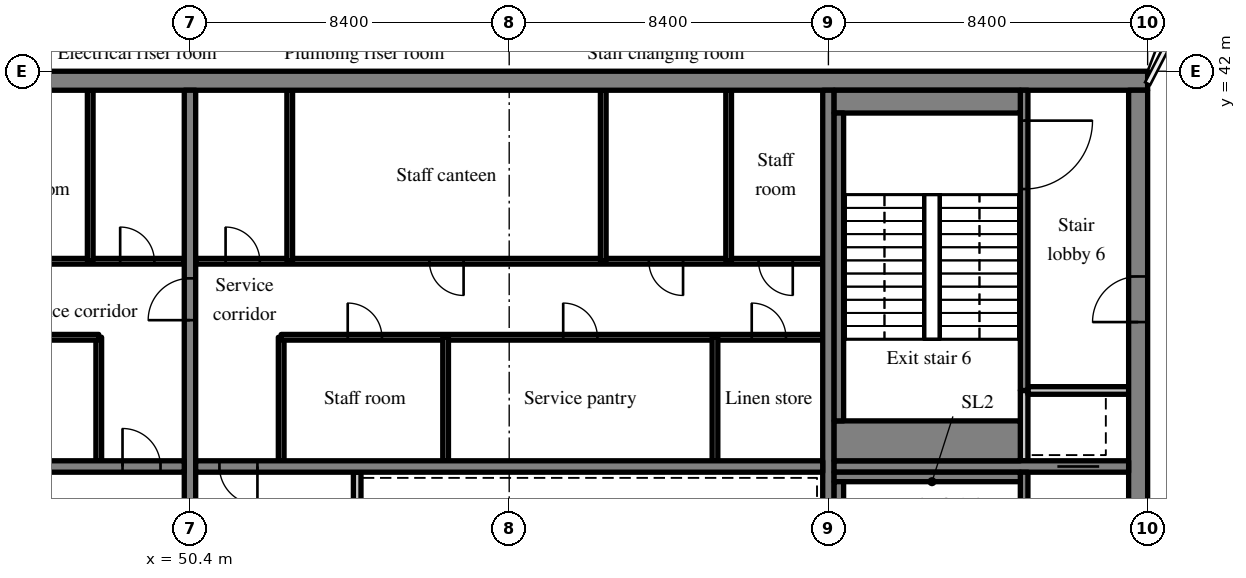
"""IFC4 building model, lengths in metres.
Left out: names, types, materials, properties, quantities, classifications, styles, units other than length and angle.
Written with IfcOpenShell. Run it as: python <this file> out.ifc"""

import sys

from ifc_helpers import new_model, si_unit, direction, frame, frame_2d, origin, place, context, subcontext, project, spatial, rectangle, extrude, source, transform, mapped, element, fill, save


model = new_model("IFC4")
c1 = context("Model", 3, precision=1e-05, world=origin(), true_north=direction((0.0, 1.0)))
c2 = subcontext(c1, "Body", "Model", "MODEL_VIEW")
j1 = project(units=[si_unit("LENGTHUNIT", "METRE"), si_unit("PLANEANGLEUNIT", "RADIAN")], contexts=[c1])
p1 = place(None, origin())
s1 = spatial("IfcSite", under=j1, at=p1, CompositionType="ELEMENT")
p2 = place(p1, origin())
s2 = spatial("IfcBuilding", under=s1, at=p2, CompositionType="ELEMENT")
p3 = place(p2, frame((0.0, 0.0, 323.7)))
s3 = spatial("IfcBuildingStorey", under=s2, at=p3, CompositionType="ELEMENT", Elevation=323.7)
m1 = source(origin(), c2, "Body", "SweptSolid", [
    extrude(rectangle(XDim=50.4, YDim=0.5, at=frame_2d((25.2, 0.0))), origin(), (0.0, 0.0, 1.0), 5.72),
])
p4 = place(p3, frame((25.2, 41.75, 0.0), z_axis=(0.0, 0.0, 1.0), x_axis=(1.0, 0.0, 0.0)))
e1 = element("IfcWall", 1, at=p4, inside=s3, PredefinedType="SHEAR", context=c2, shape_type="MappedRepresentation", body=[
    mapped(m1, transform((0.0, 0.0, 0.0), scale=1.0)),
])
m2 = source(origin(), c2, "Body", "SweptSolid", [
    extrude(rectangle(XDim=19.0, YDim=0.5, at=frame_2d((9.5, 0.0))), origin(), (0.0, 0.0, 1.0), 5.72),
])
p5 = place(p3, frame((75.35, 22.5, 0.0), z_axis=(0.0, 0.0, 1.0), x_axis=(0.0, 1.0, 0.0)))
e2 = element("IfcWall", 2, at=p5, inside=s3, PredefinedType="SHEAR", context=c2, shape_type="MappedRepresentation", body=[
    mapped(m2, transform((0.0, 0.0, 0.0), scale=1.0)),
])
m3 = source(origin(), c2, "Body", "SweptSolid", [
    extrude(rectangle(XDim=1.2, YDim=2.1, at=frame_2d((0.6, 1.05))), frame((0.0, 0.26, 0.0), z_axis=(0.0, -1.0, 0.0), x_axis=(1.0, 0.0, 0.0)), (0.0, 0.0, 1.0), 0.52),
])
p6 = place(p5, frame((12.9, 0.0, 0.0)))
e3 = element("IfcOpeningElement", 3, at=p6, cuts=e2, PredefinedType="OPENING", context=c2, shape_type="MappedRepresentation", body=[
    mapped(m3, transform((0.0, 0.0, 0.0), scale=1.0)),
])
m4 = source(origin(), c2, "Body", "SweptSolid", [
    extrude(rectangle(XDim=19.0, YDim=0.3, at=frame_2d((9.5, 0.0))), origin(), (0.0, 0.0, 1.0), 5.72),
])
p7 = place(p3, frame((50.4, 22.5, 0.0), z_axis=(0.0, 0.0, 1.0), x_axis=(0.0, 1.0, 0.0)))
e4 = element("IfcWall", 4, at=p7, inside=s3, PredefinedType="SHEAR", context=c2, shape_type="MappedRepresentation", body=[
    mapped(m4, transform((0.0, 0.0, 0.0), scale=1.0)),
])
m5 = source(origin(), c2, "Body", "SweptSolid", [
    extrude(rectangle(XDim=1.1, YDim=2.1, at=frame_2d((0.55, 1.05))), frame((0.0, 0.16, 0.0), z_axis=(0.0, -1.0, 0.0), x_axis=(1.0, 0.0, 0.0)), (0.0, 0.0, 1.0), 0.32),
])
p8 = place(p7, frame((12.95, 0.0, 0.0)))
e5 = element("IfcOpeningElement", 5, at=p8, cuts=e4, PredefinedType="OPENING", context=c2, shape_type="MappedRepresentation", body=[
    mapped(m5, transform((0.0, 0.0, 0.0), scale=1.0)),
])
p9 = place(p3, frame((67.2, 22.5, 0.0), z_axis=(0.0, 0.0, 1.0), x_axis=(0.0, 1.0, 0.0)))
e6 = element("IfcWall", 6, at=p9, inside=s3, PredefinedType="SHEAR", context=c2, shape_type="MappedRepresentation", body=[
    mapped(m4, transform((0.0, 0.0, 0.0), scale=1.0)),
])
m6 = source(origin(), c2, "Body", "SweptSolid", [
    extrude(rectangle(XDim=16.5, YDim=0.3, at=frame_2d((8.25, 0.0))), origin(), (0.0, 0.0, 1.0), 5.72),
])
p10 = place(p3, frame((33.75, 31.6, 0.0), z_axis=(0.0, 0.0, 1.0), x_axis=(1.0, 0.0, 0.0)))
e7 = element("IfcWall", 7, at=p10, inside=s3, PredefinedType="SHEAR", context=c2, shape_type="MappedRepresentation", body=[
    mapped(m6, transform((0.0, 0.0, 0.0), scale=1.0)),
])
m7 = source(origin(), c2, "Body", "SweptSolid", [
    extrude(rectangle(XDim=1.0, YDim=2.1, at=frame_2d((0.5, 1.05))), frame((0.0, 0.16, 0.0), z_axis=(0.0, -1.0, 0.0), x_axis=(1.0, 0.0, 0.0)), (0.0, 0.0, 1.0), 0.32),
])
p11 = place(p10, frame((14.875, 0.0, 0.0)))
e8 = element("IfcOpeningElement", 8, at=p11, cuts=e7, PredefinedType="OPENING", context=c2, shape_type="MappedRepresentation", body=[
    mapped(m7, transform((0.0, 0.0, 0.0), scale=1.0)),
])
p12 = place(p3, frame((50.55, 31.6, 0.0), z_axis=(0.0, 0.0, 1.0), x_axis=(1.0, 0.0, 0.0)))
e9 = element("IfcWall", 9, at=p12, inside=s3, PredefinedType="SHEAR", context=c2, shape_type="MappedRepresentation", body=[
    mapped(m6, transform((0.0, 0.0, 0.0), scale=1.0)),
])
p13 = place(p12, frame((0.625, 0.0, 0.0)))
e10 = element("IfcOpeningElement", 10, at=p13, cuts=e9, PredefinedType="OPENING", context=c2, shape_type="MappedRepresentation", body=[
    mapped(m7, transform((0.0, 0.0, 0.0), scale=1.0)),
])
m8 = source(origin(), c2, "Body", "SweptSolid", [
    extrude(rectangle(XDim=7.75, YDim=0.3, at=frame_2d((3.875, 0.0))), origin(), (0.0, 0.0, 1.0), 5.72),
])
p14 = place(p3, frame((67.35, 31.6, 0.0), z_axis=(0.0, 0.0, 1.0), x_axis=(1.0, 0.0, 0.0)))
e11 = element("IfcWall", 11, at=p14, inside=s3, PredefinedType="SHEAR", context=c2, shape_type="MappedRepresentation", body=[
    mapped(m8, transform((0.0, 0.0, 0.0), scale=1.0)),
])
p15 = place(p14, frame((5.875, 0.0, 0.0)))
e12 = element("IfcOpeningElement", 12, at=p15, cuts=e11, PredefinedType="OPENING", context=c2, shape_type="MappedRepresentation", body=[
    mapped(m5, transform((0.0, 0.0, 0.0), scale=1.0)),
])
m9 = source(origin(), c2, "Body", "SweptSolid", [
    extrude(rectangle(XDim=3.25, YDim=0.15, at=frame_2d((1.625, 0.0))), origin(), (0.0, 0.0, 1.0), 5.72),
])
p16 = place(p3, frame((48.0, 31.75, 0.0), z_axis=(0.0, 0.0, 1.0), x_axis=(0.0, 1.0, 0.0)))
e13 = element("IfcWall", 13, at=p16, inside=s3, PredefinedType="PARTITIONING", context=c2, shape_type="MappedRepresentation", body=[
    mapped(m9, transform((0.0, 0.0, 0.0), scale=1.0)),
])
m10 = source(origin(), c2, "Body", "SweptSolid", [
    extrude(rectangle(XDim=14.25, YDim=0.15, at=frame_2d((7.125, 0.0))), origin(), (0.0, 0.0, 1.0), 5.72),
])
p17 = place(p3, frame((33.75, 35.0, 0.0), z_axis=(0.0, 0.0, 1.0), x_axis=(1.0, 0.0, 0.0)))
e14 = element("IfcWall", 14, at=p17, inside=s3, PredefinedType="PARTITIONING", context=c2, shape_type="MappedRepresentation", body=[
    mapped(m10, transform((0.0, 0.0, 0.0), scale=1.0)),
])
m11 = source(origin(), c2, "Body", "SweptSolid", [
    extrude(rectangle(XDim=0.9, YDim=2.1, at=frame_2d((0.45, 1.05))), frame((0.0, 0.085, 0.0), z_axis=(0.0, -1.0, 0.0), x_axis=(1.0, 0.0, 0.0)), (0.0, 0.0, 1.0), 0.17),
])
p18 = place(p17, frame((2.031, 0.0, 0.0)))
e15 = element("IfcOpeningElement", 15, at=p18, cuts=e14, PredefinedType="OPENING", context=c2, shape_type="MappedRepresentation", body=[
    mapped(m11, transform((0.0, 0.0, 0.0), scale=1.0)),
])
p19 = place(p17, frame((9.118, 0.0, 0.0)))
e16 = element("IfcOpeningElement", 16, at=p19, cuts=e14, PredefinedType="OPENING", context=c2, shape_type="MappedRepresentation", body=[
    mapped(m11, transform((0.0, 0.0, 0.0), scale=1.0)),
])
m12 = source(origin(), c2, "Body", "SweptSolid", [
    extrude(rectangle(XDim=16.5, YDim=0.15, at=frame_2d((8.25, 0.0))), origin(), (0.0, 0.0, 1.0), 5.72),
])
p20 = place(p3, frame((33.75, 37.0, 0.0), z_axis=(0.0, 0.0, 1.0), x_axis=(1.0, 0.0, 0.0)))
e17 = element("IfcWall", 17, at=p20, inside=s3, PredefinedType="PARTITIONING", context=c2, shape_type="MappedRepresentation", body=[
    mapped(m12, transform((0.0, 0.0, 0.0), scale=1.0)),
])
p21 = place(p20, frame((3.262, 0.0, 0.0)))
e18 = element("IfcOpeningElement", 18, at=p21, cuts=e17, PredefinedType="OPENING", context=c2, shape_type="MappedRepresentation", body=[
    mapped(m11, transform((0.0, 0.0, 0.0), scale=1.0)),
])
p22 = place(p20, frame((8.212, 0.0, 0.0)))
e19 = element("IfcOpeningElement", 19, at=p22, cuts=e17, PredefinedType="OPENING", context=c2, shape_type="MappedRepresentation", body=[
    mapped(m11, transform((0.0, 0.0, 0.0), scale=1.0)),
])
p23 = place(p20, frame((11.512, 0.0, 0.0)))
e20 = element("IfcOpeningElement", 20, at=p23, cuts=e17, PredefinedType="OPENING", context=c2, shape_type="MappedRepresentation", body=[
    mapped(m11, transform((0.0, 0.0, 0.0), scale=1.0)),
])
p24 = place(p20, frame((14.813, 0.0, 0.0)))
e21 = element("IfcOpeningElement", 21, at=p24, cuts=e17, PredefinedType="OPENING", context=c2, shape_type="MappedRepresentation", body=[
    mapped(m11, transform((0.0, 0.0, 0.0), scale=1.0)),
])
m13 = source(origin(), c2, "Body", "SweptSolid", [
    extrude(rectangle(XDim=4.5, YDim=0.15, at=frame_2d((2.25, 0.0))), origin(), (0.0, 0.0, 1.0), 5.72),
])
p25 = place(p3, frame((47.775, 37.0, 0.0), z_axis=(0.0, 0.0, 1.0), x_axis=(0.0, 1.0, 0.0)))
e22 = element("IfcWall", 22, at=p25, inside=s3, PredefinedType="PARTITIONING", context=c2, shape_type="MappedRepresentation", body=[
    mapped(m13, transform((0.0, 0.0, 0.0), scale=1.0)),
])
m14 = source(origin(), c2, "Body", "SweptSolid", [
    extrude(rectangle(XDim=2.65, YDim=0.2, at=frame_2d((1.325, 0.0))), origin(), (0.0, 0.0, 1.0), 5.72),
])
p26 = place(p3, frame((54.8, 28.8, 0.0), z_axis=(0.0, 0.0, 1.0), x_axis=(0.0, 1.0, 0.0)))
e23 = element("IfcWall", 23, at=p26, inside=s3, PredefinedType="SOLIDWALL", context=c2, shape_type="MappedRepresentation", body=[
    mapped(m14, transform((0.0, 0.0, 0.0), scale=1.0)),
])
p27 = place(p3, frame((52.8, 31.75, 0.0), z_axis=(0.0, 0.0, 1.0), x_axis=(0.0, 1.0, 0.0)))
e24 = element("IfcWall", 24, at=p27, inside=s3, PredefinedType="PARTITIONING", context=c2, shape_type="MappedRepresentation", body=[
    mapped(m9, transform((0.0, 0.0, 0.0), scale=1.0)),
])
p28 = place(p3, frame((67.05, 35.0, 0.0), z_axis=(0.0, 0.0, 1.0), x_axis=(-1.0, 0.0, 0.0)))
e25 = element("IfcWall", 25, at=p28, inside=s3, PredefinedType="PARTITIONING", context=c2, shape_type="MappedRepresentation", body=[
    mapped(m10, transform((0.0, 0.0, 0.0), scale=1.0)),
])
p29 = place(p28, frame((0.968, 0.0, 0.0)))
e26 = element("IfcOpeningElement", 26, at=p29, cuts=e25, PredefinedType="OPENING", context=c2, shape_type="MappedRepresentation", body=[
    mapped(m11, transform((0.0, 0.0, 0.0), scale=1.0)),
])
p30 = place(p28, frame((5.929, 0.0, 0.0)))
e27 = element("IfcOpeningElement", 27, at=p30, cuts=e25, PredefinedType="OPENING", context=c2, shape_type="MappedRepresentation", body=[
    mapped(m11, transform((0.0, 0.0, 0.0), scale=1.0)),
])
p31 = place(p28, frame((11.599, 0.0, 0.0)))
e28 = element("IfcOpeningElement", 28, at=p31, cuts=e25, PredefinedType="OPENING", context=c2, shape_type="MappedRepresentation", body=[
    mapped(m11, transform((0.0, 0.0, 0.0), scale=1.0)),
])
p32 = place(p3, frame((67.05, 37.0, 0.0), z_axis=(0.0, 0.0, 1.0), x_axis=(-1.0, 0.0, 0.0)))
e29 = element("IfcWall", 29, at=p32, inside=s3, PredefinedType="PARTITIONING", context=c2, shape_type="MappedRepresentation", body=[
    mapped(m12, transform((0.0, 0.0, 0.0), scale=1.0)),
])
p33 = place(p32, frame((0.788, 0.0, 0.0)))
e30 = element("IfcOpeningElement", 30, at=p33, cuts=e29, PredefinedType="OPENING", context=c2, shape_type="MappedRepresentation", body=[
    mapped(m11, transform((0.0, 0.0, 0.0), scale=1.0)),
])
p34 = place(p32, frame((3.675, 0.0, 0.0)))
e31 = element("IfcOpeningElement", 31, at=p34, cuts=e29, PredefinedType="OPENING", context=c2, shape_type="MappedRepresentation", body=[
    mapped(m11, transform((0.0, 0.0, 0.0), scale=1.0)),
])
p35 = place(p32, frame((9.45, 0.0, 0.0)))
e32 = element("IfcOpeningElement", 32, at=p35, cuts=e29, PredefinedType="OPENING", context=c2, shape_type="MappedRepresentation", body=[
    mapped(m11, transform((0.0, 0.0, 0.0), scale=1.0)),
])
p36 = place(p32, frame((14.813, 0.0, 0.0)))
e33 = element("IfcOpeningElement", 33, at=p36, cuts=e29, PredefinedType="OPENING", context=c2, shape_type="MappedRepresentation", body=[
    mapped(m11, transform((0.0, 0.0, 0.0), scale=1.0)),
])
for number, where, z_axis, x_axis in (
    (34, (64.215, 31.75, 0.0), (0.0, 0.0, 1.0), (0.0, 1.0, 0.0)),
    (35, (57.127, 31.75, 0.0), (0.0, 0.0, 1.0), (0.0, 1.0, 0.0)),
):
    element("IfcWall", number, at=place(p3, frame(where, z_axis=z_axis, x_axis=x_axis)), inside=s3, PredefinedType="PARTITIONING", context=c2, shape_type="MappedRepresentation", body=[
        mapped(m9, transform((0.0, 0.0, 0.0), scale=1.0)),
    ])
for number, where, z_axis, x_axis in (
    (36, (64.575, 37.0, 0.0), (0.0, 0.0, 1.0), (0.0, 1.0, 0.0)),
    (37, (61.275, 37.0, 0.0), (0.0, 0.0, 1.0), (0.0, 1.0, 0.0)),
    (38, (53.025, 37.0, 0.0), (0.0, 0.0, 1.0), (0.0, 1.0, 0.0)),
):
    element("IfcWall", number, at=place(p3, frame(where, z_axis=z_axis, x_axis=x_axis)), inside=s3, PredefinedType="PARTITIONING", context=c2, shape_type="MappedRepresentation", body=[
        mapped(m13, transform((0.0, 0.0, 0.0), scale=1.0)),
    ])
m15 = source(origin(), c2, "Body", "SweptSolid", [
    extrude(rectangle(XDim=8.95, YDim=0.2, at=frame_2d((4.475, 0.0))), origin(), (0.0, 0.0, 1.0), 5.72),
])
p37 = place(p3, frame((72.35, 22.5, 0.0), z_axis=(0.0, 0.0, 1.0), x_axis=(0.0, 1.0, 0.0)))
e39 = element("IfcWall", 39, at=p37, inside=s3, PredefinedType="SOLIDWALL", context=c2, shape_type="MappedRepresentation", body=[
    mapped(m15, transform((0.0, 0.0, 0.0), scale=1.0)),
])
m16 = source(origin(), c2, "Body", "SweptSolid", [
    extrude(rectangle(XDim=1.2, YDim=2.1, at=frame_2d((0.6, 1.05))), frame((0.0, 0.11, 0.0), z_axis=(0.0, -1.0, 0.0), x_axis=(1.0, 0.0, 0.0)), (0.0, 0.0, 1.0), 0.22),
])
p38 = place(p37, frame((7.0, 0.0, 0.0)))
e40 = element("IfcOpeningElement", 40, at=p38, cuts=e39, PredefinedType="OPENING", context=c2, shape_type="MappedRepresentation", body=[
    mapped(m16, transform((0.0, 0.0, 0.0), scale=1.0)),
])
m17 = source(origin(), c2, "Body", "SweptSolid", [
    extrude(rectangle(XDim=1.85, YDim=0.2, at=frame_2d((0.925, 0.0))), origin(), (0.0, 0.0, 1.0), 5.72),
])
p39 = place(p3, frame((72.35, 31.75, 0.0), z_axis=(0.0, 0.0, 1.0), x_axis=(0.0, 1.0, 0.0)))
e41 = element("IfcWall", 41, at=p39, inside=s3, PredefinedType="SOLIDWALL", context=c2, shape_type="MappedRepresentation", body=[
    mapped(m17, transform((0.0, 0.0, 0.0), scale=1.0)),
])
m18 = source(origin(), c2, "Body", "SweptSolid", [
    extrude(rectangle(XDim=2.65, YDim=0.2, at=frame_2d((1.325, 0.0))), origin(), (0.0, 0.0, 1.0), 5.72),
])
p40 = place(p3, frame((72.45, 33.6, 0.0), z_axis=(0.0, 0.0, 1.0), x_axis=(1.0, 0.0, 0.0)))
e42 = element("IfcWall", 42, at=p40, inside=s3, PredefinedType="SOLIDWALL", context=c2, shape_type="MappedRepresentation", body=[
    mapped(m18, transform((0.0, 0.0, 0.0), scale=1.0)),
])
m19 = source(origin(), c2, "Body", "SweptSolid", [
    extrude(rectangle(XDim=7.9, YDim=0.2, at=frame_2d((3.95, 0.0))), origin(), (0.0, 0.0, 1.0), 5.72),
])
p41 = place(p3, frame((72.35, 33.6, 0.0), z_axis=(0.0, 0.0, 1.0), x_axis=(0.0, 1.0, 0.0)))
e43 = element("IfcWall", 43, at=p41, inside=s3, PredefinedType="SOLIDWALL", context=c2, shape_type="MappedRepresentation", body=[
    mapped(m19, transform((0.0, 0.0, 0.0), scale=1.0)),
])
m20 = source(origin(), c2, "Body", "SweptSolid", [
    extrude(rectangle(XDim=1.8, YDim=2.1, at=frame_2d((0.9, 1.05))), frame((0.0, 0.11, 0.0), z_axis=(0.0, -1.0, 0.0), x_axis=(1.0, 0.0, 0.0)), (0.0, 0.0, 1.0), 0.22),
])
p42 = place(p41, frame((5.3, 0.0, 0.0)))
e44 = element("IfcOpeningElement", 44, at=p42, cuts=e43, PredefinedType="OPENING", context=c2, shape_type="MappedRepresentation", body=[
    mapped(m20, transform((0.0, 0.0, 0.0), scale=1.0)),
])
m21 = source(origin(), c2, "Body", "SweptSolid", [
    extrude(rectangle(XDim=4.9, YDim=0.25, at=frame_2d((2.45, 0.0))), origin(), (0.0, 0.0, 1.0), 5.72),
])
p43 = place(p3, frame((67.35, 31.325, 0.0), z_axis=(0.0, 0.0, 1.0), x_axis=(1.0, 0.0, 0.0)))
e45 = element("IfcWall", 45, at=p43, inside=s3, PredefinedType="SOLIDWALL", context=c2, shape_type="MappedRepresentation", body=[
    mapped(m21, transform((0.0, 0.0, 0.0), scale=1.0)),
])
m22 = source(origin(), c2, "Body", "SweptSolid", [
    extrude(rectangle(XDim=8.1, YDim=0.25, at=frame_2d((4.05, 0.0))), origin(), (0.0, 0.0, 1.0), 5.72),
])
p44 = place(p3, frame((67.475, 23.1, 0.0), z_axis=(0.0, 0.0, 1.0), x_axis=(0.0, 1.0, 0.0)))
e46 = element("IfcWall", 46, at=p44, inside=s3, PredefinedType="SOLIDWALL", context=c2, shape_type="MappedRepresentation", body=[
    mapped(m22, transform((0.0, 0.0, 0.0), scale=1.0)),
])
m23 = source(origin(), c2, "Body", "SweptSolid", [
    extrude(rectangle(XDim=4.9, YDim=0.6, at=frame_2d((2.45, 0.0))), origin(), (0.0, 0.0, 1.0), 5.72),
])
p45 = place(p3, frame((67.35, 41.2, 0.0), z_axis=(0.0, 0.0, 1.0), x_axis=(1.0, 0.0, 0.0)))
e47 = element("IfcWall", 47, at=p45, inside=s3, PredefinedType="SOLIDWALL", context=c2, shape_type="MappedRepresentation", body=[
    mapped(m23, transform((0.0, 0.0, 0.0), scale=1.0)),
])
m24 = source(origin(), c2, "Body", "SweptSolid", [
    extrude(rectangle(XDim=4.9, YDim=1.05, at=frame_2d((2.45, 0.0))), origin(), (0.0, 0.0, 1.0), 5.72),
])
p46 = place(p3, frame((67.35, 32.275, 0.0), z_axis=(0.0, 0.0, 1.0), x_axis=(1.0, 0.0, 0.0)))
e48 = element("IfcWall", 48, at=p46, inside=s3, PredefinedType="SOLIDWALL", context=c2, shape_type="MappedRepresentation", body=[
    mapped(m24, transform((0.0, 0.0, 0.0), scale=1.0)),
])
p47 = place(p3, frame((67.475, 32.8, 0.0), z_axis=(0.0, 0.0, 1.0), x_axis=(0.0, 1.0, 0.0)))
e49 = element("IfcWall", 49, at=p47, inside=s3, PredefinedType="SOLIDWALL", context=c2, shape_type="MappedRepresentation", body=[
    mapped(m22, transform((0.0, 0.0, 0.0), scale=1.0)),
])
m25 = source(origin(), c2, "Body", "SweptSolid", [
    extrude(rectangle(XDim=1.0, YDim=2.1, at=frame_2d((0.5, 1.05))), frame((0.0, 0.025, 0.0), z_axis=(0.0, -1.0, 0.0), x_axis=(1.0, 0.0, 0.0)), (0.0, 0.0, 1.0), 0.05),
])
p48 = place(p11, origin())
e50 = element("IfcDoor", 50, at=p48, inside=s3, OperationType="SINGLE_SWING_LEFT", PredefinedType="DOOR", context=c2, shape_type="MappedRepresentation", body=[
    mapped(m25, transform((0.0, 0.0, 0.0), scale=1.0)),
])
fill(e8, e50)
m26 = source(origin(), c2, "Body", "SweptSolid", [
    extrude(rectangle(XDim=0.9, YDim=2.1, at=frame_2d((0.45, 1.05))), frame((0.0, 0.025, 0.0), z_axis=(0.0, -1.0, 0.0), x_axis=(1.0, 0.0, 0.0)), (0.0, 0.0, 1.0), 0.05),
])
p49 = place(p24, origin())
e51 = element("IfcDoor", 51, at=p49, inside=s3, OperationType="SINGLE_SWING_LEFT", PredefinedType="DOOR", context=c2, shape_type="MappedRepresentation", body=[
    mapped(m26, transform((0.0, 0.0, 0.0), scale=1.0)),
])
fill(e21, e51)
p50 = place(p13, origin())
e52 = element("IfcDoor", 52, at=p50, inside=s3, OperationType="SINGLE_SWING_RIGHT", PredefinedType="DOOR", context=c2, shape_type="MappedRepresentation", body=[
    mapped(m25, transform((0.0, 0.0, 0.0), scale=1.0)),
])
fill(e10, e52)
p51 = place(p29, origin())
e53 = element("IfcDoor", 53, at=p51, inside=s3, OperationType="SINGLE_SWING_RIGHT", PredefinedType="DOOR", context=c2, shape_type="MappedRepresentation", body=[
    mapped(m26, transform((0.0, 0.0, 0.0), scale=1.0)),
])
fill(e26, e53)
p52 = place(p30, origin())
e54 = element("IfcDoor", 54, at=p52, inside=s3, OperationType="SINGLE_SWING_RIGHT", PredefinedType="DOOR", context=c2, shape_type="MappedRepresentation", body=[
    mapped(m26, transform((0.0, 0.0, 0.0), scale=1.0)),
])
fill(e27, e54)
p53 = place(p31, origin())
e55 = element("IfcDoor", 55, at=p53, inside=s3, OperationType="SINGLE_SWING_RIGHT", PredefinedType="DOOR", context=c2, shape_type="MappedRepresentation", body=[
    mapped(m26, transform((0.0, 0.0, 0.0), scale=1.0)),
])
fill(e28, e55)
p54 = place(p33, origin())
e56 = element("IfcDoor", 56, at=p54, inside=s3, OperationType="SINGLE_SWING_LEFT", PredefinedType="DOOR", context=c2, shape_type="MappedRepresentation", body=[
    mapped(m26, transform((0.0, 0.0, 0.0), scale=1.0)),
])
fill(e30, e56)
p55 = place(p34, origin())
e57 = element("IfcDoor", 57, at=p55, inside=s3, OperationType="SINGLE_SWING_LEFT", PredefinedType="DOOR", context=c2, shape_type="MappedRepresentation", body=[
    mapped(m26, transform((0.0, 0.0, 0.0), scale=1.0)),
])
fill(e31, e57)
p56 = place(p35, origin())
e58 = element("IfcDoor", 58, at=p56, inside=s3, OperationType="SINGLE_SWING_LEFT", PredefinedType="DOOR", context=c2, shape_type="MappedRepresentation", body=[
    mapped(m26, transform((0.0, 0.0, 0.0), scale=1.0)),
])
fill(e32, e58)
p57 = place(p36, origin())
e59 = element("IfcDoor", 59, at=p57, inside=s3, OperationType="SINGLE_SWING_RIGHT", PredefinedType="DOOR", context=c2, shape_type="MappedRepresentation", body=[
    mapped(m26, transform((0.0, 0.0, 0.0), scale=1.0)),
])
fill(e33, e59)
m27 = source(origin(), c2, "Body", "SweptSolid", [
    extrude(rectangle(XDim=1.1, YDim=2.1, at=frame_2d((0.55, 1.05))), frame((0.0, 0.025, 0.0), z_axis=(0.0, -1.0, 0.0), x_axis=(1.0, 0.0, 0.0)), (0.0, 0.0, 1.0), 0.05),
])
p58 = place(p15, origin())
e60 = element("IfcDoor", 60, at=p58, inside=s3, OperationType="SLIDING_TO_LEFT", PredefinedType="DOOR", context=c2, shape_type="MappedRepresentation", body=[
    mapped(m27, transform((0.0, 0.0, 0.0), scale=1.0)),
])
fill(e12, e60)
m28 = source(origin(), c2, "Body", "SweptSolid", [
    extrude(rectangle(XDim=1.8, YDim=2.1, at=frame_2d((0.9, 1.05))), frame((0.0, 0.025, 0.0), z_axis=(0.0, -1.0, 0.0), x_axis=(1.0, 0.0, 0.0)), (0.0, 0.0, 1.0), 0.05),
])
p59 = place(p42, origin())
e61 = element("IfcDoor", 61, at=p59, inside=s3, OperationType="SINGLE_SWING_RIGHT", PredefinedType="DOOR", context=c2, shape_type="MappedRepresentation", body=[
    mapped(m28, transform((0.0, 0.0, 0.0), scale=1.0)),
])
fill(e44, e61)
m29 = source(origin(), c2, "Body", "SweptSolid", [
    extrude(rectangle(XDim=1.2, YDim=2.1, at=frame_2d((0.6, 1.05))), frame((0.0, 0.025, 0.0), z_axis=(0.0, -1.0, 0.0), x_axis=(1.0, 0.0, 0.0)), (0.0, 0.0, 1.0), 0.05),
])
p60 = place(p6, origin())
e62 = element("IfcDoor", 62, at=p60, inside=s3, OperationType="SINGLE_SWING_LEFT", PredefinedType="DOOR", context=c2, shape_type="MappedRepresentation", body=[
    mapped(m29, transform((0.0, 0.0, 0.0), scale=1.0)),
])
fill(e3, e62)
p61 = place(p8, origin())
e63 = element("IfcDoor", 63, at=p61, inside=s3, OperationType="SINGLE_SWING_LEFT", PredefinedType="DOOR", context=c2, shape_type="MappedRepresentation", body=[
    mapped(m27, transform((0.0, 0.0, 0.0), scale=1.0)),
])
fill(e5, e63)
save(model, sys.argv[1])
